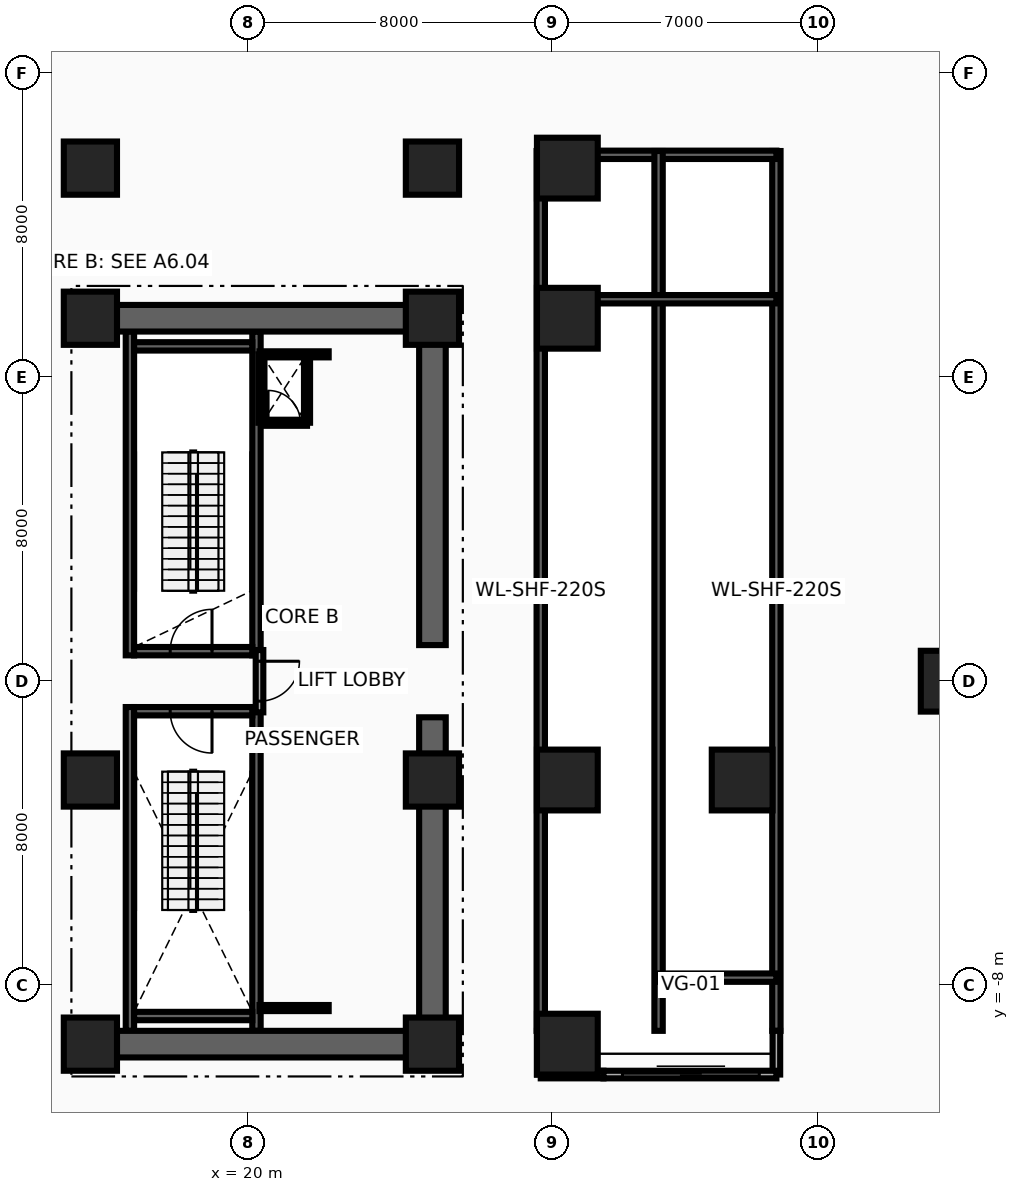
"""IFC4 building model, lengths in metres.
Left out: names, types, materials, properties, quantities, classifications, styles, units other than length and angle.
Written with IfcOpenShell. Run it as: python <this file> out.ifc"""

import sys

from ifc_helpers import new_model, si_unit, direction, frame, frame_2d, origin, origin_2d, place, context, subcontext, project, spatial, rectangle, extrude, source, transform, mapped, element, fill, save


model = new_model("IFC4")
c1 = context("Model", 3, precision=1e-05, world=origin(), true_north=direction((0.0, 1.0)))
c2 = subcontext(c1, "Body", "Model", "MODEL_VIEW")
j1 = project(units=[si_unit("LENGTHUNIT", "METRE"), si_unit("PLANEANGLEUNIT", "RADIAN")], contexts=[c1])
p1 = place(None, origin())
s1 = spatial("IfcSite", under=j1, at=p1, CompositionType="ELEMENT")
p2 = place(p1, origin())
s2 = spatial("IfcBuilding", under=s1, at=p2, CompositionType="ELEMENT")
p3 = place(p2, frame((0.0, 0.0, -4.8)))
s3 = spatial("IfcBuildingStorey", under=s2, at=p3, CompositionType="ELEMENT", Elevation=-4.8)
for number, where, z_axis, x_axis in (
    (1, (16.89, 0.68, 0.0), (0.0, 0.0, 1.0), (0.0, 1.0, 0.0)),
    (2, (20.22, 0.68, 0.0), (0.0, 0.0, 1.0), (0.0, 1.0, 0.0)),
):
    element("IfcWall", number, at=place(p3, frame(where, z_axis=z_axis, x_axis=x_axis)), inside=s3, PredefinedType="SHEAR", context=c2, shape_type="SweptSolid", body=[
        extrude(rectangle(XDim=8.52, YDim=0.22, at=frame_2d((4.26, 0.0))), origin(), (0.0, 0.0, 1.0), 4.52),
    ])
p4 = place(p3, frame((17.0, 0.79, 0.0), z_axis=(0.0, 0.0, 1.0), x_axis=(1.0, 0.0, 0.0)))
e3 = element("IfcWall", 3, at=p4, inside=s3, PredefinedType="SHEAR", context=c2, shape_type="SweptSolid", body=[
    extrude(rectangle(XDim=3.11, YDim=0.22, at=frame_2d((1.555, 0.0))), origin(), (0.0, 0.0, 1.0), 4.52),
])
p5 = place(p4, frame((0.95, 0.0, 0.0)))
e4 = element("IfcOpeningElement", 4, at=p5, cuts=e3, PredefinedType="OPENING", context=c2, shape_type="SweptSolid", body=[
    extrude(rectangle(XDim=1.1, YDim=2.15, at=frame_2d((0.55, 1.075))), frame((0.0, 0.125, 0.0), z_axis=(0.0, -1.0, 0.0), x_axis=(1.0, 0.0, 0.0)), (0.0, 0.0, 1.0), 0.25),
])
p6 = place(p3, frame((17.0, 8.81, 0.0), z_axis=(0.0, 0.0, 1.0), x_axis=(1.0, 0.0, 0.0)))
e5 = element("IfcWall", 5, at=p6, inside=s3, PredefinedType="SHEAR", context=c2, shape_type="SweptSolid", body=[
    extrude(rectangle(XDim=3.11, YDim=0.22, at=frame_2d((1.555, 0.0))), origin(), (0.0, 0.0, 1.0), 4.52),
])
for number, where, z_axis, x_axis in (
    (6, (16.89, -9.2, 0.0), (0.0, 0.0, 1.0), (0.0, 1.0, 0.0)),
    (7, (20.22, -9.2, 0.0), (0.0, 0.0, 1.0), (0.0, 1.0, 0.0)),
):
    element("IfcWall", number, at=place(p3, frame(where, z_axis=z_axis, x_axis=x_axis)), inside=s3, PredefinedType="SHEAR", context=c2, shape_type="SweptSolid", body=[
        extrude(rectangle(XDim=8.52, YDim=0.22, at=frame_2d((4.26, 0.0))), origin(), (0.0, 0.0, 1.0), 4.52),
    ])
p7 = place(p3, frame((17.0, -8.81, 0.0), z_axis=(0.0, 0.0, 1.0), x_axis=(1.0, 0.0, 0.0)))
e8 = element("IfcWall", 8, at=p7, inside=s3, PredefinedType="SHEAR", context=c2, shape_type="SweptSolid", body=[
    extrude(rectangle(XDim=3.11, YDim=0.22, at=frame_2d((1.555, 0.0))), origin(), (0.0, 0.0, 1.0), 4.52),
])
p8 = place(p3, frame((17.0, -0.79, 0.0), z_axis=(0.0, 0.0, 1.0), x_axis=(1.0, 0.0, 0.0)))
e9 = element("IfcWall", 9, at=p8, inside=s3, PredefinedType="SHEAR", context=c2, shape_type="SweptSolid", body=[
    extrude(rectangle(XDim=3.11, YDim=0.22, at=frame_2d((1.555, 0.0))), origin(), (0.0, 0.0, 1.0), 4.52),
])
p9 = place(p8, frame((0.95, 0.0, 0.0)))
e10 = element("IfcOpeningElement", 10, at=p9, cuts=e9, PredefinedType="OPENING", context=c2, shape_type="SweptSolid", body=[
    extrude(rectangle(XDim=1.1, YDim=2.15, at=frame_2d((0.55, 1.075))), frame((0.0, 0.125, 0.0), z_axis=(0.0, -1.0, 0.0), x_axis=(1.0, 0.0, 0.0)), (0.0, 0.0, 1.0), 0.25),
])
for number, where, z_axis, x_axis in (
    (11, (24.85, -9.9, 0.0), (0.0, 0.0, 1.0), (0.0, 1.0, 0.0)),
    (12, (24.85, 0.95, 0.0), (0.0, 0.0, 1.0), (0.0, 1.0, 0.0)),
):
    element("IfcWall", number, at=place(p3, frame(where, z_axis=z_axis, x_axis=x_axis)), inside=s3, PredefinedType="SHEAR", context=c2, shape_type="SweptSolid", body=[
        extrude(rectangle(XDim=8.95, YDim=0.7, at=frame_2d((4.475, 0.0))), origin(), (0.0, 0.0, 1.0), 4.52),
    ])
for number, where, z_axis, x_axis in (
    (13, (15.85, 9.55, 0.0), (0.0, 0.0, 1.0), (1.0, 0.0, 0.0)),
    (14, (15.85, -9.55, 0.0), (0.0, 0.0, 1.0), (1.0, 0.0, 0.0)),
):
    element("IfcWall", number, at=place(p3, frame(where, z_axis=z_axis, x_axis=x_axis)), inside=s3, PredefinedType="SHEAR", context=c2, shape_type="SweptSolid", body=[
        extrude(rectangle(XDim=9.0, YDim=0.7, at=frame_2d((4.5, 0.0))), origin(), (0.0, 0.0, 1.0), 4.52),
    ])
m1 = source(origin(), c2, "Body", "SweptSolid", [
    extrude(rectangle(XDim=1.4, YDim=1.4, at=origin_2d()), origin(), (0.0, 0.0, 1.0), 4.8),
])
for number, where, z_axis, x_axis in (
    (15, (15.85, -9.55, 0.0), (0.0, 0.0, 1.0), (1.0, 0.0, 0.0)),
    (16, (24.85, -9.55, 0.0), (0.0, 0.0, 1.0), (1.0, 0.0, 0.0)),
):
    element("IfcColumn", number, at=place(p3, frame(where, z_axis=z_axis, x_axis=x_axis)), inside=s3, PredefinedType="COLUMN", context=c2, shape_type="MappedRepresentation", body=[
        mapped(m1, transform((0.0, 0.0, 0.0), x_axis=(1.0, 0.0, 0.0), y_axis=(0.0, 1.0, 0.0), z_axis=(0.0, 0.0, 1.0), scale=1.0)),
    ])
m2 = source(origin(), c2, "Body", "SweptSolid", [
    extrude(rectangle(XDim=1.6, YDim=1.6, at=origin_2d()), origin(), (0.0, 0.0, 1.0), 4.8),
])
p10 = place(p3, frame((28.4, -9.55, 0.0), z_axis=(0.0, 0.0, 1.0), x_axis=(1.0, 0.0, 0.0)))
e17 = element("IfcColumn", 17, at=p10, inside=s3, PredefinedType="COLUMN", context=c2, shape_type="MappedRepresentation", body=[
    mapped(m2, transform((0.0, 0.0, 0.0), x_axis=(1.0, 0.0, 0.0), y_axis=(0.0, 1.0, 0.0), z_axis=(0.0, 0.0, 1.0), scale=1.0)),
])
for number, where, z_axis, x_axis in (
    (18, (15.85, -2.6, 0.0), (0.0, 0.0, 1.0), (1.0, 0.0, 0.0)),
    (19, (24.85, -2.6, 0.0), (0.0, 0.0, 1.0), (1.0, 0.0, 0.0)),
):
    element("IfcColumn", number, at=place(p3, frame(where, z_axis=z_axis, x_axis=x_axis)), inside=s3, PredefinedType="COLUMN", context=c2, shape_type="MappedRepresentation", body=[
        mapped(m1, transform((0.0, 0.0, 0.0), x_axis=(1.0, 0.0, 0.0), y_axis=(0.0, 1.0, 0.0), z_axis=(0.0, 0.0, 1.0), scale=1.0)),
    ])
p11 = place(p3, frame((28.4, -2.6, 0.0), z_axis=(0.0, 0.0, 1.0), x_axis=(1.0, 0.0, 0.0)))
e20 = element("IfcColumn", 20, at=p11, inside=s3, PredefinedType="COLUMN", context=c2, shape_type="MappedRepresentation", body=[
    mapped(m2, transform((0.0, 0.0, 0.0), x_axis=(1.0, 0.0, 0.0), y_axis=(0.0, 1.0, 0.0), z_axis=(0.0, 0.0, 1.0), scale=1.0)),
])
for number, where, z_axis, x_axis in (
    (21, (15.85, 9.55, 0.0), (0.0, 0.0, 1.0), (1.0, 0.0, 0.0)),
    (22, (24.85, 9.55, 0.0), (0.0, 0.0, 1.0), (1.0, 0.0, 0.0)),
):
    element("IfcColumn", number, at=place(p3, frame(where, z_axis=z_axis, x_axis=x_axis)), inside=s3, PredefinedType="COLUMN", context=c2, shape_type="MappedRepresentation", body=[
        mapped(m1, transform((0.0, 0.0, 0.0), x_axis=(1.0, 0.0, 0.0), y_axis=(0.0, 1.0, 0.0), z_axis=(0.0, 0.0, 1.0), scale=1.0)),
    ])
p12 = place(p3, frame((28.4, 9.55, 0.0), z_axis=(0.0, 0.0, 1.0), x_axis=(1.0, 0.0, 0.0)))
e23 = element("IfcColumn", 23, at=p12, inside=s3, PredefinedType="COLUMN", context=c2, shape_type="MappedRepresentation", body=[
    mapped(m2, transform((0.0, 0.0, 0.0), x_axis=(1.0, 0.0, 0.0), y_axis=(0.0, 1.0, 0.0), z_axis=(0.0, 0.0, 1.0), scale=1.0)),
])
for number, where, z_axis, x_axis in (
    (24, (15.85, 13.5, 0.0), (0.0, 0.0, 1.0), (1.0, 0.0, 0.0)),
    (25, (24.85, 13.5, 0.0), (0.0, 0.0, 1.0), (1.0, 0.0, 0.0)),
):
    element("IfcColumn", number, at=place(p3, frame(where, z_axis=z_axis, x_axis=x_axis)), inside=s3, PredefinedType="COLUMN", context=c2, shape_type="MappedRepresentation", body=[
        mapped(m1, transform((0.0, 0.0, 0.0), x_axis=(1.0, 0.0, 0.0), y_axis=(0.0, 1.0, 0.0), z_axis=(0.0, 0.0, 1.0), scale=1.0)),
    ])
for number, where, z_axis, x_axis in (
    (26, (28.4, 13.5, 0.0), (0.0, 0.0, 1.0), (1.0, 0.0, 0.0)),
    (27, (33.0, -2.6, 0.0), (0.0, 0.0, 1.0), (1.0, 0.0, 0.0)),
    (28, (38.5, 0.0, 0.0), (0.0, 0.0, 1.0), (1.0, 0.0, 0.0)),
):
    element("IfcColumn", number, at=place(p3, frame(where, z_axis=z_axis, x_axis=x_axis)), inside=s3, PredefinedType="COLUMN", context=c2, shape_type="MappedRepresentation", body=[
        mapped(m2, transform((0.0, 0.0, 0.0), x_axis=(1.0, 0.0, 0.0), y_axis=(0.0, 1.0, 0.0), z_axis=(0.0, 0.0, 1.0), scale=1.0)),
    ])
p13 = place(p3, frame((27.7, -9.2, 0.0), z_axis=(0.0, 0.0, 1.0), x_axis=(0.0, 1.0, 0.0)))
e29 = element("IfcWall", 29, at=p13, inside=s3, PredefinedType="SHEAR", context=c2, shape_type="SweptSolid", body=[
    extrude(rectangle(XDim=23.15, YDim=0.22, at=frame_2d((11.575, 0.0))), origin(), (0.0, 0.0, 1.0), 4.54),
])
p14 = place(p3, frame((33.9, -9.2, 0.0), z_axis=(0.0, 0.0, 1.0), x_axis=(0.0, 1.0, 0.0)))
e30 = element("IfcWall", 30, at=p14, inside=s3, PredefinedType="SHEAR", context=c2, shape_type="SweptSolid", body=[
    extrude(rectangle(XDim=23.15, YDim=0.22, at=frame_2d((11.575, 0.0))), origin(), (0.0, 0.0, 1.0), 4.78),
])
p15 = place(p3, frame((27.7, 13.85, 0.0), z_axis=(0.0, 0.0, 1.0), x_axis=(1.0, 0.0, 0.0)))
e31 = element("IfcWall", 31, at=p15, inside=s3, PredefinedType="SHEAR", context=c2, shape_type="SweptSolid", body=[
    extrude(rectangle(XDim=6.2, YDim=0.22, at=frame_2d((3.1, 0.0))), origin(), (0.0, 0.0, 1.0), 2.04),
])
p16 = place(p3, frame((30.8, -9.2, 0.0), z_axis=(0.0, 0.0, 1.0), x_axis=(0.0, 1.0, 0.0)))
e32 = element("IfcWall", 32, at=p16, inside=s3, PredefinedType="SHEAR", context=c2, shape_type="SweptSolid", body=[
    extrude(rectangle(XDim=23.15, YDim=0.22, at=frame_2d((11.575, 0.0))), origin(), (0.0, 0.0, 1.0), 4.78),
])
p17 = place(p3, frame((27.7, 10.05, 0.0), z_axis=(0.0, 0.0, 1.0), x_axis=(1.0, 0.0, 0.0)))
e33 = element("IfcWall", 33, at=p17, inside=s3, PredefinedType="SHEAR", context=c2, shape_type="SweptSolid", body=[
    extrude(rectangle(XDim=6.2, YDim=0.22, at=frame_2d((3.1, 0.0))), origin(), (0.0, 0.0, 1.0), 2.04),
])
p18 = place(p3, frame((30.8, -7.8, 2.4), z_axis=(0.0, 0.0, 1.0), x_axis=(1.0, 0.0, 0.0)))
e34 = element("IfcWall", 34, at=p18, inside=s3, PredefinedType="SHEAR", context=c2, shape_type="SweptSolid", body=[
    extrude(rectangle(XDim=3.1, YDim=0.22, at=frame_2d((1.55, 0.0))), origin(), (0.0, 0.0, 1.0), 2.14),
])
p19 = place(p3, frame((20.3, -0.82, 0.0), z_axis=(0.0, 0.0, 1.0), x_axis=(0.0, 1.0, 0.0)))
e35 = element("IfcWall", 35, at=p19, inside=s3, PredefinedType="PARTITIONING", context=c2, shape_type="SweptSolid", body=[
    extrude(rectangle(XDim=1.64, YDim=0.2, at=frame_2d((0.82, 0.0))), origin(), (0.0, 0.0, 1.0), 4.52),
])
p20 = place(p19, frame((0.295, 0.0, 0.0)))
e36 = element("IfcOpeningElement", 36, at=p20, cuts=e35, PredefinedType="OPENING", context=c2, shape_type="SweptSolid", body=[
    extrude(rectangle(XDim=1.05, YDim=2.15, at=frame_2d((0.525, 1.075))), frame((0.0, 0.115, 0.0), z_axis=(0.0, -1.0, 0.0), x_axis=(1.0, 0.0, 0.0)), (0.0, 0.0, 1.0), 0.23),
])
p21 = place(p3, frame((20.35, 6.8, 0.0), z_axis=(0.0, 0.0, 1.0), x_axis=(1.0, 0.0, 0.0)))
e37 = element("IfcWall", 37, at=p21, inside=s3, PredefinedType="PARTITIONING", context=c2, shape_type="SweptSolid", body=[
    extrude(rectangle(XDim=1.2, YDim=0.16, at=frame_2d((0.6, 0.0))), origin(), (0.0, 0.0, 1.0), 4.52),
])
p22 = place(p21, frame((0.175, 0.0, 0.0)))
e38 = element("IfcOpeningElement", 38, at=p22, cuts=e37, PredefinedType="OPENING", context=c2, shape_type="SweptSolid", body=[
    extrude(rectangle(XDim=0.85, YDim=2.05, at=frame_2d((0.425, 1.025))), frame((0.0, 0.095, 0.0), z_axis=(0.0, -1.0, 0.0), x_axis=(1.0, 0.0, 0.0)), (0.0, 0.0, 1.0), 0.19),
])
for number, where, z_axis, x_axis in (
    (39, (21.55, 6.8, 0.0), (0.0, 0.0, 1.0), (0.0, 1.0, 0.0)),
    (40, (20.35, 6.8, 0.0), (0.0, 0.0, 1.0), (0.0, 1.0, 0.0)),
):
    element("IfcWall", number, at=place(p3, frame(where, z_axis=z_axis, x_axis=x_axis)), inside=s3, PredefinedType="PARTITIONING", context=c2, shape_type="SweptSolid", body=[
        extrude(rectangle(XDim=1.8, YDim=0.16, at=frame_2d((0.9, 0.0))), origin(), (0.0, 0.0, 1.0), 4.52),
    ])
for number, where, z_axis, x_axis in (
    (41, (20.3, -8.6, 0.0), (0.0, 0.0, 1.0), (1.0, 0.0, 0.0)),
    (42, (20.3, 8.6, 0.0), (0.0, 0.0, 1.0), (1.0, 0.0, 0.0)),
):
    element("IfcWall", number, at=place(p3, frame(where, z_axis=z_axis, x_axis=x_axis)), inside=s3, PredefinedType="PARTITIONING", context=c2, shape_type="SweptSolid", body=[
        extrude(rectangle(XDim=1.82, YDim=0.16, at=frame_2d((0.91, 0.0))), origin(), (0.0, 0.0, 1.0), 4.52),
    ])
p23 = place(p3, frame((27.7, -10.35, 0.0), z_axis=(0.0, 0.0, 1.0), x_axis=(0.0, 1.0, 0.0)))
e43 = element("IfcWall", 43, at=p23, inside=s3, PredefinedType="MOVABLE", context=c2, shape_type="SweptSolid", body=[
    extrude(rectangle(XDim=1.15, YDim=0.2, at=frame_2d((0.575, 0.0))), origin(), (0.0, 0.0, 1.0), 3.557),
])
p24 = place(p3, frame((33.9, -10.35, 0.0), z_axis=(0.0, 0.0, 1.0), x_axis=(0.0, 1.0, 0.0)))
e44 = element("IfcWall", 44, at=p24, inside=s3, PredefinedType="MOVABLE", context=c2, shape_type="SweptSolid", body=[
    extrude(rectangle(XDim=1.15, YDim=0.2, at=frame_2d((0.575, 0.0))), origin(), (0.0, 0.0, 1.0), 4.52),
])
p25 = place(p3, frame((27.7, -10.35, 0.0), z_axis=(0.0, 0.0, 1.0), x_axis=(1.0, 0.0, 0.0)))
e45 = element("IfcWall", 45, at=p25, inside=s3, PredefinedType="MOVABLE", context=c2, shape_type="SweptSolid", body=[
    extrude(rectangle(XDim=1.65, YDim=0.2, at=frame_2d((0.825, 0.0))), origin(), (0.0, 0.0, 1.0), 4.52),
])
p26 = place(p3, frame((29.35, -10.35, 0.0), z_axis=(0.0, 0.0, 1.0), x_axis=(1.0, 0.0, 0.0)))
e46 = element("IfcWall", 46, at=p26, inside=s3, PredefinedType="MOVABLE", context=c2, shape_type="SweptSolid", body=[
    extrude(rectangle(XDim=4.55, YDim=0.2, at=frame_2d((2.275, 0.0))), origin(), (0.0, 0.0, 1.0), 3.956),
])
p27 = place(p26, frame((0.5, 0.0, 0.0)))
e47 = element("IfcOpeningElement", 47, at=p27, cuts=e46, PredefinedType="OPENING", context=c2, shape_type="SweptSolid", body=[
    extrude(rectangle(XDim=3.6, YDim=2.5, at=frame_2d((1.8, 1.25))), frame((0.0, 0.115, 0.0), z_axis=(0.0, -1.0, 0.0), x_axis=(1.0, 0.0, 0.0)), (0.0, 0.0, 1.0), 0.23),
])
p28 = place(p20, frame((1.05, 0.0, 0.0), z_axis=(0.0, 0.0, 1.0), x_axis=(-1.0, 0.0, 0.0)))
e48 = element("IfcDoor", 48, at=p28, inside=s3, OperationType="SINGLE_SWING_LEFT", PredefinedType="DOOR", context=c2, shape_type="SweptSolid", body=[
    extrude(rectangle(XDim=1.05, YDim=2.15, at=frame_2d((0.525, 1.075))), frame((0.0, 0.025, 0.0), z_axis=(0.0, -1.0, 0.0), x_axis=(1.0, 0.0, 0.0)), (0.0, 0.0, 1.0), 0.05),
])
fill(e36, e48)
p29 = place(p5, origin())
e49 = element("IfcDoor", 49, at=p29, inside=s3, OperationType="SINGLE_SWING_RIGHT", PredefinedType="DOOR", context=c2, shape_type="SweptSolid", body=[
    extrude(rectangle(XDim=1.1, YDim=2.15, at=frame_2d((0.55, 1.075))), frame((0.0, 0.025, 0.0), z_axis=(0.0, -1.0, 0.0), x_axis=(1.0, 0.0, 0.0)), (0.0, 0.0, 1.0), 0.05),
])
fill(e4, e49)
p30 = place(p9, frame((1.1, 0.0, 0.0), z_axis=(0.0, 0.0, 1.0), x_axis=(-1.0, 0.0, 0.0)))
e50 = element("IfcDoor", 50, at=p30, inside=s3, OperationType="SINGLE_SWING_LEFT", PredefinedType="DOOR", context=c2, shape_type="SweptSolid", body=[
    extrude(rectangle(XDim=1.1, YDim=2.15, at=frame_2d((0.55, 1.075))), frame((0.0, 0.025, 0.0), z_axis=(0.0, -1.0, 0.0), x_axis=(1.0, 0.0, 0.0)), (0.0, 0.0, 1.0), 0.05),
])
fill(e10, e50)
p31 = place(p22, origin())
e51 = element("IfcDoor", 51, at=p31, inside=s3, OperationType="SINGLE_SWING_RIGHT", PredefinedType="DOOR", context=c2, shape_type="SweptSolid", body=[
    extrude(rectangle(XDim=0.85, YDim=2.05, at=frame_2d((0.425, 1.025))), frame((0.0, 0.025, 0.0), z_axis=(0.0, -1.0, 0.0), x_axis=(1.0, 0.0, 0.0)), (0.0, 0.0, 1.0), 0.05),
])
fill(e38, e51)
p32 = place(p27, origin())
e52 = element("IfcDoor", 52, at=p32, inside=s3, OperationType="ROLLINGUP", PredefinedType="GATE", context=c2, shape_type="SweptSolid", body=[
    extrude(rectangle(XDim=3.6, YDim=2.5, at=frame_2d((1.8, 1.25))), frame((0.0, 0.025, 0.0), z_axis=(0.0, -1.0, 0.0), x_axis=(1.0, 0.0, 0.0)), (0.0, 0.0, 1.0), 0.05),
])
fill(e47, e52)
save(model, sys.argv[1])
